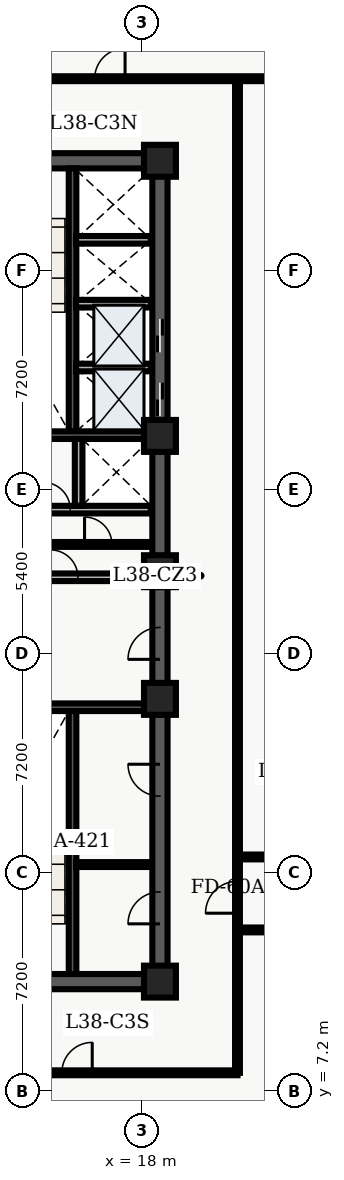
"""IFC4 building model, lengths in metres.
Left out: names, types, materials, properties, quantities, classifications, styles, units other than length and angle.
Written with IfcOpenShell. Run it as: python <this file> out.ifc"""

import sys

from ifc_helpers import new_model, entity, si_unit, converted_unit, direction, frame, origin_with_axes, origin_2d_with_axis, place, context, subcontext, project, spatial, polyline, rectangle, outline, extrude, element, fill, save


model = new_model("IFC4")
c1 = context("Model", 3, precision=1e-05, world=origin_with_axes(), true_north=direction((0.0, 1.0)))
c2 = subcontext(c1, "Body", "Model", "MODEL_VIEW")
j1 = project(units=[si_unit("LENGTHUNIT", "METRE"), converted_unit("PLANEANGLEUNIT", "DEGREE", entity("IfcPlaneAngleMeasure", 0.017), si_unit("PLANEANGLEUNIT", "RADIAN"), dimensions=[0, 0, 0, 0, 0, 0, 0])], contexts=[c1])
p1 = place(None, origin_with_axes())
s1 = spatial("IfcSite", under=j1, at=p1, CompositionType="ELEMENT")
p2 = place(p1, origin_with_axes())
s2 = spatial("IfcBuilding", under=s1, at=p2, CompositionType="ELEMENT")
p3 = place(p2, frame((0.0, 0.0, 156.3), z_axis=(0.0, 0.0, 1.0), x_axis=(1.0, 0.0, 0.0)))
s3 = spatial("IfcBuildingStorey", under=s2, at=p3, CompositionType="ELEMENT", Elevation=156.3)
p4 = place(p3, frame((11.4, 10.8, 0.0), z_axis=(0.0, 0.0, 1.0), x_axis=(1.0, 0.0, 0.0)))
e1 = element("IfcWall", 1, at=p4, inside=s3, PredefinedType="SHEAR", context=c2, shape_type="SweptSolid", body=[
    extrude(outline(polyline([(0.0, -0.25), (7.2, -0.25), (7.2, 0.25), (0.0, 0.25), (0.0, -0.25)])), origin_with_axes(), (0.0, 0.0, 1.0), 3.66),
])
p5 = place(p4, frame((2.625, 0.0, 0.0), z_axis=(0.0, 0.0, 1.0), x_axis=(1.0, 0.0, 0.0)))
e2 = element("IfcOpeningElement", 2, at=p5, cuts=e1, PredefinedType="OPENING", context=c2, shape_type="SweptSolid", body=[
    extrude(rectangle(XDim=1.05, YDim=0.52, at=origin_2d_with_axis()), origin_with_axes(), (0.0, 0.0, 1.0), 2.15),
])
p6 = place(p3, frame((11.4, 37.8, 0.0), z_axis=(0.0, 0.0, 1.0), x_axis=(1.0, 0.0, 0.0)))
e3 = element("IfcWall", 3, at=p6, inside=s3, PredefinedType="SHEAR", context=c2, shape_type="SweptSolid", body=[
    extrude(outline(polyline([(0.0, -0.25), (7.2, -0.25), (7.2, 0.25), (0.0, 0.25), (0.0, -0.25)])), origin_with_axes(), (0.0, 0.0, 1.0), 3.66),
])
p7 = place(p6, frame((2.625, 0.0, 0.0), z_axis=(0.0, 0.0, 1.0), x_axis=(1.0, 0.0, 0.0)))
e4 = element("IfcOpeningElement", 4, at=p7, cuts=e3, PredefinedType="OPENING", context=c2, shape_type="SweptSolid", body=[
    extrude(rectangle(XDim=1.05, YDim=0.52, at=origin_2d_with_axis()), origin_with_axes(), (0.0, 0.0, 1.0), 2.15),
])
p8 = place(p3, frame((18.6, 10.8, 0.0), z_axis=(0.0, 0.0, 1.0), x_axis=(0.0, 1.0, 0.0)))
e5 = element("IfcWall", 5, at=p8, inside=s3, PredefinedType="SHEAR", context=c2, shape_type="SweptSolid", body=[
    extrude(outline(polyline([(0.0, -0.25), (13.5, -0.25), (13.5, 0.25), (0.0, 0.25), (0.0, -0.25)])), origin_with_axes(), (0.0, 0.0, 1.0), 3.66),
])
p9 = place(p8, frame((11.125, 0.0, 0.0), z_axis=(0.0, 0.0, 1.0), x_axis=(1.0, 0.0, 0.0)))
e6 = element("IfcOpeningElement", 6, at=p9, cuts=e5, PredefinedType="OPENING", context=c2, shape_type="SweptSolid", body=[
    extrude(rectangle(XDim=1.05, YDim=0.52, at=origin_2d_with_axis()), origin_with_axes(), (0.0, 0.0, 1.0), 2.15),
])
p10 = place(p8, frame((2.425, 0.0, 0.0), z_axis=(0.0, 0.0, 1.0), x_axis=(1.0, 0.0, 0.0)))
e7 = element("IfcOpeningElement", 7, at=p10, cuts=e5, PredefinedType="OPENING", context=c2, shape_type="SweptSolid", body=[
    extrude(rectangle(XDim=1.05, YDim=0.52, at=origin_2d_with_axis()), origin_with_axes(), (0.0, 0.0, 1.0), 2.15),
])
p11 = place(p8, frame((6.625, 0.0, 0.0), z_axis=(0.0, 0.0, 1.0), x_axis=(1.0, 0.0, 0.0)))
e8 = element("IfcOpeningElement", 8, at=p11, cuts=e5, PredefinedType="OPENING", context=c2, shape_type="SweptSolid", body=[
    extrude(rectangle(XDim=1.05, YDim=0.52, at=origin_2d_with_axis()), origin_with_axes(), (0.0, 0.0, 1.0), 2.15),
])
p12 = place(p3, frame((18.6, 24.3, 0.0), z_axis=(0.0, 0.0, 1.0), x_axis=(0.0, 1.0, 0.0)))
e9 = element("IfcWall", 9, at=p12, inside=s3, PredefinedType="SHEAR", context=c2, shape_type="SweptSolid", body=[
    extrude(outline(polyline([(0.0, -0.25), (13.5, -0.25), (13.5, 0.25), (0.0, 0.25), (0.0, -0.25)])), origin_with_axes(), (0.0, 0.0, 1.0), 3.66),
])
p13 = place(p12, frame((5.65, 0.0, 0.0), z_axis=(0.0, 0.0, 1.0), x_axis=(1.0, 0.0, 0.0)))
e10 = element("IfcOpeningElement", 10, at=p13, cuts=e9, PredefinedType="OPENING", context=c2, shape_type="SweptSolid", body=[
    extrude(rectangle(XDim=1.1, YDim=0.52, at=origin_2d_with_axis()), origin_with_axes(), (0.0, 0.0, 1.0), 2.15),
])
p14 = place(p12, frame((7.75, 0.0, 0.0), z_axis=(0.0, 0.0, 1.0), x_axis=(1.0, 0.0, 0.0)))
e11 = element("IfcOpeningElement", 11, at=p14, cuts=e9, PredefinedType="OPENING", context=c2, shape_type="SweptSolid", body=[
    extrude(rectangle(XDim=1.1, YDim=0.52, at=origin_2d_with_axis()), origin_with_axes(), (0.0, 0.0, 1.0), 2.15),
])
p15 = place(p3, frame((15.725, 11.05, 0.0), z_axis=(0.0, 0.0, 1.0), x_axis=(0.0, 1.0, 0.0)))
e12 = element("IfcWall", 12, at=p15, inside=s3, PredefinedType="SHEAR", context=c2, shape_type="SweptSolid", body=[
    extrude(outline(polyline([(0.0, -0.125), (8.65, -0.125), (8.65, 0.125), (0.0, 0.125), (0.0, -0.125)])), origin_with_axes(), (0.0, 0.0, 1.0), 3.66),
])
p16 = place(p3, frame((11.65, 19.825, 0.0), z_axis=(0.0, 0.0, 1.0), x_axis=(1.0, 0.0, 0.0)))
e13 = element("IfcWall", 13, at=p16, inside=s3, PredefinedType="SHEAR", context=c2, shape_type="SweptSolid", body=[
    extrude(outline(polyline([(0.0, -0.125), (6.7, -0.125), (6.7, 0.125), (0.0, 0.125), (0.0, -0.125)])), origin_with_axes(), (0.0, 0.0, 1.0), 3.66),
])
p17 = place(p3, frame((15.725, 28.9, 0.0), z_axis=(0.0, 0.0, 1.0), x_axis=(0.0, 1.0, 0.0)))
e14 = element("IfcWall", 14, at=p17, inside=s3, PredefinedType="SHEAR", context=c2, shape_type="SweptSolid", body=[
    extrude(outline(polyline([(0.0, -0.125), (8.65, -0.125), (8.65, 0.125), (0.0, 0.125), (0.0, -0.125)])), origin_with_axes(), (0.0, 0.0, 1.0), 3.66),
])
p18 = place(p3, frame((11.65, 28.775, 0.0), z_axis=(0.0, 0.0, 1.0), x_axis=(1.0, 0.0, 0.0)))
e15 = element("IfcWall", 15, at=p18, inside=s3, PredefinedType="SHEAR", context=c2, shape_type="SweptSolid", body=[
    extrude(outline(polyline([(0.0, -0.125), (6.7, -0.125), (6.7, 0.125), (0.0, 0.125), (0.0, -0.125)])), origin_with_axes(), (0.0, 0.0, 1.0), 3.66),
])
p19 = place(p3, frame((11.7, 24.1, 0.0), z_axis=(0.0, 0.0, 1.0), x_axis=(1.0, 0.0, 0.0)))
e16 = element("IfcWall", 16, at=p19, inside=s3, PredefinedType="SOLIDWALL", context=c2, shape_type="SweptSolid", body=[
    extrude(outline(polyline([(0.0, -0.125), (6.6, -0.125), (6.6, 0.125), (0.0, 0.125), (0.0, -0.125)])), origin_with_axes(), (0.0, 0.0, 1.0), 2.7),
])
p20 = place(p19, frame((3.75, 0.0, 0.0), z_axis=(0.0, 0.0, 1.0), x_axis=(1.0, 0.0, 0.0)))
e17 = element("IfcOpeningElement", 17, at=p20, cuts=e16, PredefinedType="OPENING", context=c2, shape_type="SweptSolid", body=[
    extrude(rectangle(XDim=0.9, YDim=0.27, at=origin_2d_with_axis()), origin_with_axes(), (0.0, 0.0, 1.0), 2.15),
])
p21 = place(p3, frame((11.7, 26.325, 0.0), z_axis=(0.0, 0.0, 1.0), x_axis=(1.0, 0.0, 0.0)))
e18 = element("IfcWall", 18, at=p21, inside=s3, PredefinedType="SOLIDWALL", context=c2, shape_type="SweptSolid", body=[
    extrude(outline(polyline([(0.0, -0.125), (6.6, -0.125), (6.6, 0.125), (0.0, 0.125), (0.0, -0.125)])), origin_with_axes(), (0.0, 0.0, 1.0), 2.7),
])
p22 = place(p21, frame((3.5, 0.0, 0.0), z_axis=(0.0, 0.0, 1.0), x_axis=(1.0, 0.0, 0.0)))
e19 = element("IfcOpeningElement", 19, at=p22, cuts=e18, PredefinedType="OPENING", context=c2, shape_type="SweptSolid", body=[
    extrude(rectangle(XDim=0.9, YDim=0.27, at=origin_2d_with_axis()), origin_with_axes(), (0.0, 0.0, 1.0), 2.15),
])
p23 = place(p3, frame((15.925, 26.45, 0.0), z_axis=(0.0, 0.0, 1.0), x_axis=(0.0, 1.0, 0.0)))
e20 = element("IfcWall", 20, at=p23, inside=s3, PredefinedType="SOLIDWALL", context=c2, shape_type="SweptSolid", body=[
    extrude(outline(polyline([(0.0, -0.125), (2.2, -0.125), (2.2, 0.125), (0.0, 0.125), (0.0, -0.125)])), origin_with_axes(), (0.0, 0.0, 1.0), 2.7),
])
for number, where, z_axis, x_axis in (
    (21, (18.6, 10.8, 0.0), (0.0, 0.0, 1.0), (1.0, 0.0, 0.0)),
    (22, (18.6, 20.1, 0.0), (0.0, 0.0, 1.0), (1.0, 0.0, 0.0)),
    (23, (18.6, 24.3, 0.0), (0.0, 0.0, 1.0), (1.0, 0.0, 0.0)),
    (24, (18.6, 28.75, 0.0), (0.0, 0.0, 1.0), (1.0, 0.0, 0.0)),
    (25, (18.6, 37.8, 0.0), (0.0, 0.0, 1.0), (1.0, 0.0, 0.0)),
):
    element("IfcColumn", number, at=place(p3, frame(where, z_axis=z_axis, x_axis=x_axis)), inside=s3, PredefinedType="COLUMN", context=c2, shape_type="SweptSolid", body=[
        extrude(rectangle(XDim=1.05, YDim=1.05, at=origin_2d_with_axis()), origin_with_axes(), (0.0, 0.0, 1.0), 3.9),
    ])
p24 = place(p3, frame((14.62, 25.18, 0.0), z_axis=(0.0, 0.0, 1.0), x_axis=(1.0, 0.0, 0.0)))
e26 = element("IfcWall", 26, at=p24, inside=s3, PredefinedType="PARTITIONING", context=c2, shape_type="SweptSolid", body=[
    extrude(outline(polyline([(0.0, -0.08), (3.68, -0.08), (3.68, 0.08), (0.0, 0.08), (0.0, -0.08)])), origin_with_axes(), (0.0, 0.0, 1.0), 2.7),
])
p25 = place(p24, frame((1.95, 0.0, 0.0), z_axis=(0.0, 0.0, 1.0), x_axis=(1.0, 0.0, 0.0)))
e27 = element("IfcOpeningElement", 27, at=p25, cuts=e26, PredefinedType="OPENING", context=c2, shape_type="SweptSolid", body=[
    extrude(rectangle(XDim=0.9, YDim=0.18, at=origin_2d_with_axis()), origin_with_axes(), (0.0, 0.0, 1.0), 2.15),
])
p26 = place(p3, frame((15.84, 14.65, 0.0), z_axis=(0.0, 0.0, 1.0), x_axis=(1.0, 0.0, 0.0)))
e28 = element("IfcWall", 28, at=p26, inside=s3, PredefinedType="PARTITIONING", context=c2, shape_type="SweptSolid", body=[
    extrude(outline(polyline([(0.0, -0.08), (2.46, -0.08), (2.46, 0.08), (0.0, 0.08), (0.0, -0.08)])), origin_with_axes(), (0.0, 0.0, 1.0), 2.7),
])
for number, where, z_axis, x_axis in (
    (29, (15.84, 31.0, 0.0), (0.0, 0.0, 1.0), (1.0, 0.0, 0.0)),
    (30, (15.84, 33.1, 0.0), (0.0, 0.0, 1.0), (1.0, 0.0, 0.0)),
    (31, (15.84, 35.2, 0.0), (0.0, 0.0, 1.0), (1.0, 0.0, 0.0)),
):
    element("IfcWall", number, at=place(p3, frame(where, z_axis=z_axis, x_axis=x_axis)), inside=s3, PredefinedType="SOLIDWALL", context=c2, shape_type="SweptSolid", body=[
        extrude(outline(polyline([(0.0, -0.125), (2.46, -0.125), (2.46, 0.125), (0.0, 0.125), (0.0, -0.125)])), origin_with_axes(), (0.0, 0.0, 1.0), 2.7),
    ])
p27 = place(p3, frame((2.6, 7.8, 0.0), z_axis=(0.0, 0.0, 1.0), x_axis=(1.0, 0.0, 0.0)))
e32 = element("IfcWall", 32, at=p27, inside=s3, PredefinedType="PARTITIONING", context=c2, shape_type="SweptSolid", body=[
    extrude(outline(polyline([(0.0, -0.08), (18.55, -0.08), (18.55, 0.08), (0.0, 0.08), (0.0, -0.08)])), origin_with_axes(), (0.0, 0.0, 1.0), 2.7),
])
p28 = place(p27, frame((3.737, 0.0, 0.0), z_axis=(0.0, 0.0, 1.0), x_axis=(1.0, 0.0, 0.0)))
e33 = element("IfcOpeningElement", 33, at=p28, cuts=e32, PredefinedType="OPENING", context=c2, shape_type="SweptSolid", body=[
    extrude(rectangle(XDim=1.0, YDim=0.18, at=origin_2d_with_axis()), origin_with_axes(), (0.0, 0.0, 1.0), 2.15),
])
p29 = place(p27, frame((13.273, 0.0, 0.0), z_axis=(0.0, 0.0, 1.0), x_axis=(1.0, 0.0, 0.0)))
e34 = element("IfcOpeningElement", 34, at=p29, cuts=e32, PredefinedType="OPENING", context=c2, shape_type="SweptSolid", body=[
    extrude(rectangle(XDim=1.0, YDim=0.18, at=origin_2d_with_axis()), origin_with_axes(), (0.0, 0.0, 1.0), 2.15),
])
p30 = place(p3, frame((2.6, 40.5, 0.0), z_axis=(0.0, 0.0, 1.0), x_axis=(1.0, 0.0, 0.0)))
e35 = element("IfcWall", 35, at=p30, inside=s3, PredefinedType="PARTITIONING", context=c2, shape_type="SweptSolid", body=[
    extrude(outline(polyline([(0.0, -0.08), (20.117, -0.08), (20.117, 0.08), (0.0, 0.08), (0.0, -0.08)])), origin_with_axes(), (0.0, 0.0, 1.0), 2.7),
])
p31 = place(p30, frame((1.72, 0.0, 0.0), z_axis=(0.0, 0.0, 1.0), x_axis=(1.0, 0.0, 0.0)))
e36 = element("IfcOpeningElement", 36, at=p31, cuts=e35, PredefinedType="OPENING", context=c2, shape_type="SweptSolid", body=[
    extrude(rectangle(XDim=1.0, YDim=0.18, at=origin_2d_with_axis()), origin_with_axes(), (0.0, 0.0, 1.0), 2.15),
])
p32 = place(p30, frame((7.776, 0.0, 0.0), z_axis=(0.0, 0.0, 1.0), x_axis=(1.0, 0.0, 0.0)))
e37 = element("IfcOpeningElement", 37, at=p32, cuts=e35, PredefinedType="OPENING", context=c2, shape_type="SweptSolid", body=[
    extrude(rectangle(XDim=1.0, YDim=0.18, at=origin_2d_with_axis()), origin_with_axes(), (0.0, 0.0, 1.0), 2.15),
])
p33 = place(p30, frame((11.113, 0.0, 0.0), z_axis=(0.0, 0.0, 1.0), x_axis=(1.0, 0.0, 0.0)))
e38 = element("IfcOpeningElement", 38, at=p33, cuts=e35, PredefinedType="OPENING", context=c2, shape_type="SweptSolid", body=[
    extrude(rectangle(XDim=1.0, YDim=0.18, at=origin_2d_with_axis()), origin_with_axes(), (0.0, 0.0, 1.0), 2.15),
])
p34 = place(p30, frame((14.352, 0.0, 0.0), z_axis=(0.0, 0.0, 1.0), x_axis=(1.0, 0.0, 0.0)))
e39 = element("IfcOpeningElement", 39, at=p34, cuts=e35, PredefinedType="OPENING", context=c2, shape_type="SweptSolid", body=[
    extrude(rectangle(XDim=1.0, YDim=0.18, at=origin_2d_with_axis()), origin_with_axes(), (0.0, 0.0, 1.0), 2.15),
])
p35 = place(p3, frame((21.15, 7.8, 0.0), z_axis=(0.0, 0.0, 1.0), x_axis=(0.0, 1.0, 0.0)))
e40 = element("IfcWall", 40, at=p35, inside=s3, PredefinedType="PARTITIONING", context=c2, shape_type="SweptSolid", body=[
    extrude(outline(polyline([(0.0, -0.08), (32.7, -0.08), (32.7, 0.08), (0.0, 0.08), (0.0, -0.08)])), origin_with_axes(), (0.0, 0.0, 1.0), 2.7),
])
p36 = place(p35, frame((5.775, 0.0, 0.0), z_axis=(0.0, 0.0, 1.0), x_axis=(1.0, 0.0, 0.0)))
e41 = element("IfcOpeningElement", 41, at=p36, cuts=e40, PredefinedType="OPENING", context=c2, shape_type="SweptSolid", body=[
    extrude(rectangle(XDim=1.05, YDim=0.18, at=origin_2d_with_axis()), origin_with_axes(), (0.0, 0.0, 1.0), 2.15),
])
p37 = place(p3, frame((21.15, 12.5, 0.0), z_axis=(0.0, 0.0, 1.0), x_axis=(1.0, 0.0, 0.0)))
e42 = element("IfcWall", 42, at=p37, inside=s3, PredefinedType="PARTITIONING", context=c2, shape_type="SweptSolid", body=[
    extrude(outline(polyline([(0.0, -0.08), (15.2, -0.08), (15.2, 0.08), (0.0, 0.08), (0.0, -0.08)])), origin_with_axes(), (0.0, 0.0, 1.0), 2.7),
])
p38 = place(p37, frame((2.276, 0.0, 0.0), z_axis=(0.0, 0.0, 1.0), x_axis=(1.0, 0.0, 0.0)))
e43 = element("IfcOpeningElement", 43, at=p38, cuts=e42, PredefinedType="OPENING", context=c2, shape_type="SweptSolid", body=[
    extrude(rectangle(XDim=1.0, YDim=0.18, at=origin_2d_with_axis()), origin_with_axes(), (0.0, 0.0, 1.0), 2.15),
])
p39 = place(p37, frame((6.824, 0.0, 0.0), z_axis=(0.0, 0.0, 1.0), x_axis=(1.0, 0.0, 0.0)))
e44 = element("IfcOpeningElement", 44, at=p39, cuts=e42, PredefinedType="OPENING", context=c2, shape_type="SweptSolid", body=[
    extrude(rectangle(XDim=1.0, YDim=0.18, at=origin_2d_with_axis()), origin_with_axes(), (0.0, 0.0, 1.0), 2.15),
])
p40 = place(p37, frame((12.198, 0.0, 0.0), z_axis=(0.0, 0.0, 1.0), x_axis=(1.0, 0.0, 0.0)))
e45 = element("IfcOpeningElement", 45, at=p40, cuts=e42, PredefinedType="OPENING", context=c2, shape_type="SweptSolid", body=[
    extrude(rectangle(XDim=1.2, YDim=0.18, at=origin_2d_with_axis()), origin_with_axes(), (0.0, 0.0, 1.0), 2.2),
])
p41 = place(p3, frame((21.15, 14.9, 0.0), z_axis=(0.0, 0.0, 1.0), x_axis=(1.0, 0.0, 0.0)))
e46 = element("IfcWall", 46, at=p41, inside=s3, PredefinedType="PARTITIONING", context=c2, shape_type="SweptSolid", body=[
    extrude(outline(polyline([(0.0, -0.08), (15.2, -0.08), (15.2, 0.08), (0.0, 0.08), (0.0, -0.08)])), origin_with_axes(), (0.0, 0.0, 1.0), 2.7),
])
p42 = place(p41, frame((3.506, 0.0, 0.0), z_axis=(0.0, 0.0, 1.0), x_axis=(1.0, 0.0, 0.0)))
e47 = element("IfcOpeningElement", 47, at=p42, cuts=e46, PredefinedType="OPENING", context=c2, shape_type="SweptSolid", body=[
    extrude(rectangle(XDim=1.0, YDim=0.18, at=origin_2d_with_axis()), origin_with_axes(), (0.0, 0.0, 1.0), 2.15),
])
p43 = place(p41, frame((10.976, 0.0, 0.0), z_axis=(0.0, 0.0, 1.0), x_axis=(1.0, 0.0, 0.0)))
e48 = element("IfcOpeningElement", 48, at=p43, cuts=e46, PredefinedType="OPENING", context=c2, shape_type="SweptSolid", body=[
    extrude(rectangle(XDim=1.0, YDim=0.18, at=origin_2d_with_axis()), origin_with_axes(), (0.0, 0.0, 1.0), 2.15),
])
p44 = place(p12, frame((5.65, 0.0, 0.0), z_axis=(0.0, 0.0, 1.0), x_axis=(1.0, 0.0, 0.0)))
e49 = element("IfcDoor", 49, at=p44, inside=s3, OperationType="SLIDING_TO_LEFT", PredefinedType="DOOR", context=c2, shape_type="SweptSolid", body=[
    extrude(rectangle(XDim=1.1, YDim=0.09, at=origin_2d_with_axis()), origin_with_axes(), (0.0, 0.0, 1.0), 2.15),
])
fill(e10, e49)
p45 = place(p12, frame((7.75, 0.0, 0.0), z_axis=(0.0, 0.0, 1.0), x_axis=(1.0, 0.0, 0.0)))
e50 = element("IfcDoor", 50, at=p45, inside=s3, OperationType="SLIDING_TO_RIGHT", PredefinedType="DOOR", context=c2, shape_type="SweptSolid", body=[
    extrude(rectangle(XDim=1.1, YDim=0.09, at=origin_2d_with_axis()), origin_with_axes(), (0.0, 0.0, 1.0), 2.15),
])
fill(e11, e50)
p46 = place(p8, frame((11.125, 0.0, 0.0), z_axis=(0.0, 0.0, 1.0), x_axis=(1.0, 0.0, 0.0)))
e51 = element("IfcDoor", 51, at=p46, inside=s3, OperationType="SINGLE_SWING_LEFT", PredefinedType="DOOR", context=c2, shape_type="SweptSolid", body=[
    extrude(rectangle(XDim=1.05, YDim=0.09, at=origin_2d_with_axis()), origin_with_axes(), (0.0, 0.0, 1.0), 2.15),
])
fill(e6, e51)
p47 = place(p21, frame((3.5, 0.0, 0.0), z_axis=(0.0, 0.0, 1.0), x_axis=(1.0, 0.0, 0.0)))
e52 = element("IfcDoor", 52, at=p47, inside=s3, OperationType="SINGLE_SWING_LEFT", PredefinedType="DOOR", context=c2, shape_type="SweptSolid", body=[
    extrude(rectangle(XDim=0.9, YDim=0.09, at=origin_2d_with_axis()), origin_with_axes(), (0.0, 0.0, 1.0), 2.15),
])
fill(e19, e52)
p48 = place(p19, frame((3.75, 0.0, 0.0), z_axis=(0.0, 0.0, 1.0), x_axis=(1.0, 0.0, 0.0)))
e53 = element("IfcDoor", 53, at=p48, inside=s3, OperationType="SINGLE_SWING_LEFT", PredefinedType="DOOR", context=c2, shape_type="SweptSolid", body=[
    extrude(rectangle(XDim=0.9, YDim=0.09, at=origin_2d_with_axis()), origin_with_axes(), (0.0, 0.0, 1.0), 2.15),
])
fill(e17, e53)
p49 = place(p24, frame((1.95, 0.0, 0.0), z_axis=(0.0, 0.0, 1.0), x_axis=(1.0, 0.0, 0.0)))
e54 = element("IfcDoor", 54, at=p49, inside=s3, OperationType="SINGLE_SWING_LEFT", PredefinedType="DOOR", context=c2, shape_type="SweptSolid", body=[
    extrude(rectangle(XDim=0.9, YDim=0.09, at=origin_2d_with_axis()), origin_with_axes(), (0.0, 0.0, 1.0), 2.15),
])
fill(e27, e54)
p50 = place(p8, frame((2.425, 0.0, 0.0), z_axis=(0.0, 0.0, 1.0), x_axis=(1.0, 0.0, 0.0)))
e55 = element("IfcDoor", 55, at=p50, inside=s3, OperationType="SINGLE_SWING_LEFT", PredefinedType="DOOR", context=c2, shape_type="SweptSolid", body=[
    extrude(rectangle(XDim=1.05, YDim=0.09, at=origin_2d_with_axis()), origin_with_axes(), (0.0, 0.0, 1.0), 2.15),
])
fill(e7, e55)
p51 = place(p8, frame((6.625, 0.0, 0.0), z_axis=(0.0, 0.0, 1.0), x_axis=(1.0, 0.0, 0.0)))
e56 = element("IfcDoor", 56, at=p51, inside=s3, OperationType="SINGLE_SWING_RIGHT", PredefinedType="DOOR", context=c2, shape_type="SweptSolid", body=[
    extrude(rectangle(XDim=1.05, YDim=0.09, at=origin_2d_with_axis()), origin_with_axes(), (0.0, 0.0, 1.0), 2.15),
])
fill(e8, e56)
p52 = place(p27, frame((13.273, 0.0, 0.0), z_axis=(0.0, 0.0, 1.0), x_axis=(1.0, 0.0, 0.0)))
e57 = element("IfcDoor", 57, at=p52, inside=s3, OperationType="SINGLE_SWING_RIGHT", PredefinedType="DOOR", context=c2, shape_type="SweptSolid", body=[
    extrude(rectangle(XDim=1.0, YDim=0.09, at=origin_2d_with_axis()), origin_with_axes(), (0.0, 0.0, 1.0), 2.15),
])
fill(e34, e57)
p53 = place(p30, frame((14.352, 0.0, 0.0), z_axis=(0.0, 0.0, 1.0), x_axis=(1.0, 0.0, 0.0)))
e58 = element("IfcDoor", 58, at=p53, inside=s3, OperationType="SINGLE_SWING_RIGHT", PredefinedType="DOOR", context=c2, shape_type="SweptSolid", body=[
    extrude(rectangle(XDim=1.0, YDim=0.09, at=origin_2d_with_axis()), origin_with_axes(), (0.0, 0.0, 1.0), 2.15),
])
fill(e39, e58)
p54 = place(p35, frame((5.775, 0.0, 0.0), z_axis=(0.0, 0.0, 1.0), x_axis=(1.0, 0.0, 0.0)))
e59 = element("IfcDoor", 59, at=p54, inside=s3, OperationType="SINGLE_SWING_LEFT", PredefinedType="DOOR", context=c2, shape_type="SweptSolid", body=[
    extrude(rectangle(XDim=1.05, YDim=0.09, at=origin_2d_with_axis()), origin_with_axes(), (0.0, 0.0, 1.0), 2.15),
])
fill(e41, e59)
save(model, sys.argv[1])
